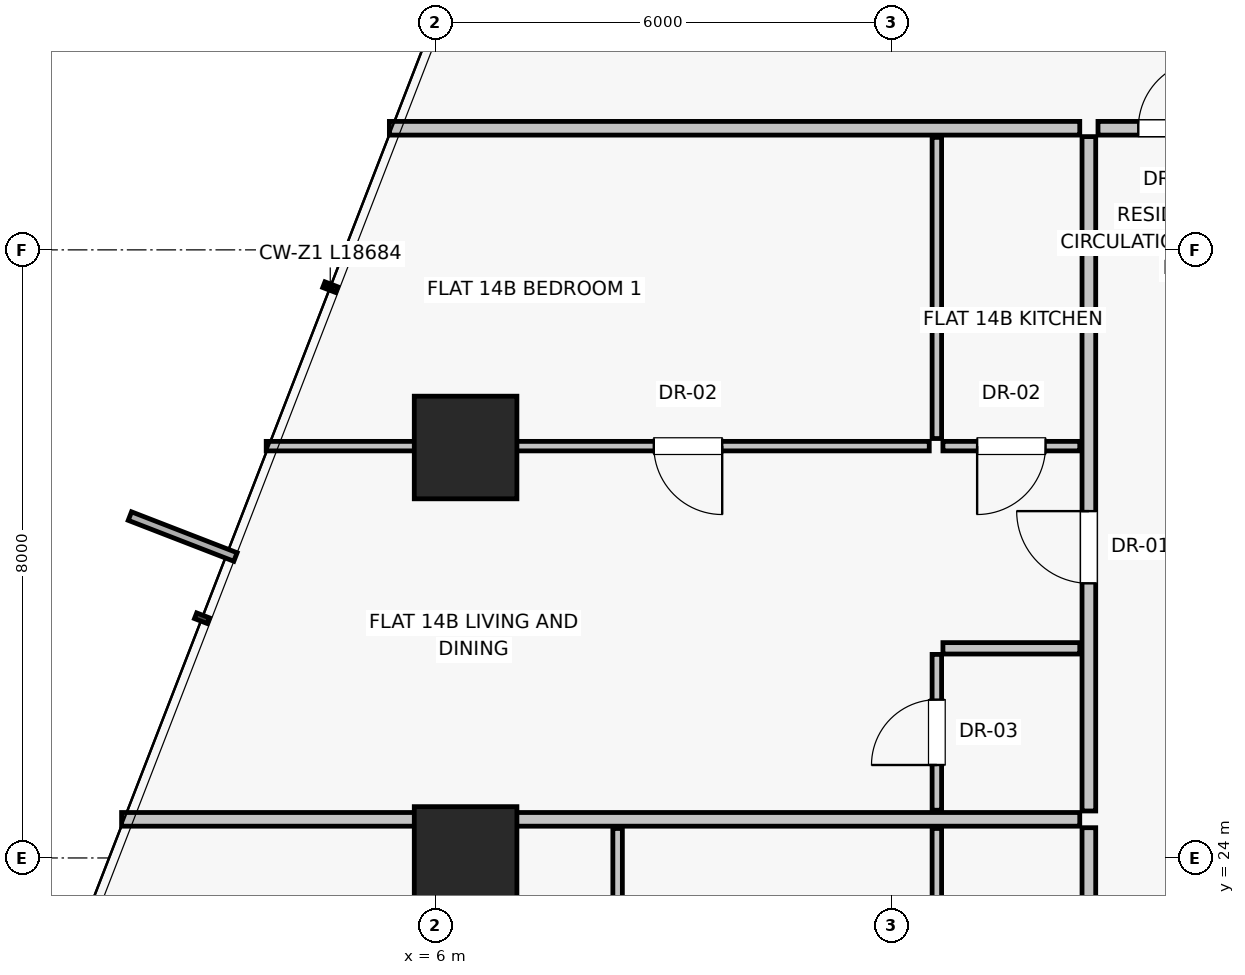
"""IFC4 building model, lengths in metres.
Left out: names, types, materials, properties, quantities, classifications, styles, units other than length and angle.
Written with IfcOpenShell. Run it as: python <this file> out.ifc"""

import sys

from ifc_helpers import new_model, si_unit, direction, frame, frame_2d, origin, origin_2d, place, context, subcontext, project, spatial, rectangle, extrude, source, transform, mapped, element, fill, save


model = new_model("IFC4")
c1 = context("Model", 3, precision=1e-05, world=origin(), true_north=direction((0.0, 1.0)))
c2 = subcontext(c1, "Body", "Model", "MODEL_VIEW")
j1 = project(units=[si_unit("LENGTHUNIT", "METRE"), si_unit("PLANEANGLEUNIT", "RADIAN")], contexts=[c1])
p1 = place(None, origin())
s1 = spatial("IfcSite", under=j1, at=p1, CompositionType="ELEMENT")
p2 = place(p1, origin())
s2 = spatial("IfcBuilding", under=s1, at=p2, CompositionType="ELEMENT")
p3 = place(p2, frame((0.0, 0.0, 53.3)))
s3 = spatial("IfcBuildingStorey", under=s2, at=p3, CompositionType="ELEMENT", Elevation=53.3)
for number, where, z_axis, x_axis in (
    (1, (6.4, 29.4, 0.0), (0.0, 0.0, 1.0), (1.0, 0.0, 0.0)),
    (2, (6.4, 24.0, 0.0), (0.0, 0.0, 1.0), (1.0, 0.0, 0.0)),
):
    element("IfcColumn", number, at=place(p3, frame(where, z_axis=z_axis, x_axis=x_axis)), inside=s3, PredefinedType="COLUMN", context=c2, shape_type="SweptSolid", body=[
        extrude(rectangle(XDim=1.35, YDim=1.35, at=origin_2d()), origin(), (0.0, 0.0, 1.0), 3.25),
    ])
p4 = place(p3, frame((14.48, 33.6, 0.0), z_axis=(0.0, 0.0, 1.0), x_axis=(-1.0, 0.0, 0.0)))
e3 = element("IfcWall", 3, at=p4, inside=s3, PredefinedType="PARTITIONING", context=c2, shape_type="SweptSolid", body=[
    extrude(rectangle(XDim=9.083, YDim=0.18, at=frame_2d((4.542, 0.0))), origin(), (0.0, 0.0, 1.0), 2.97),
])
p5 = place(p3, frame((14.6, 14.31, 0.0), z_axis=(0.0, 0.0, 1.0), x_axis=(0.0, 1.0, 0.0)))
e4 = element("IfcWall", 4, at=p5, inside=s3, PredefinedType="PARTITIONING", context=c2, shape_type="SweptSolid", body=[
    extrude(rectangle(XDim=10.088, YDim=0.18, at=frame_2d((5.044, 0.0))), origin(), (0.0, 0.0, 1.0), 2.97),
])
p6 = place(p5, frame((3.426, 0.0, 0.0)))
e5 = element("IfcOpeningElement", 5, at=p6, cuts=e4, PredefinedType="OPENING", context=c2, shape_type="SweptSolid", body=[
    extrude(rectangle(XDim=0.95, YDim=2.02, at=frame_2d((0.475, 1.01))), frame((0.0, 0.1, 0.0), z_axis=(0.0, -1.0, 0.0), x_axis=(1.0, 0.0, 0.0)), (0.0, 0.0, 1.0), 0.2),
])
for number, where, z_axis, x_axis in (
    (6, (12.6, 20.072, 0.0), (0.0, 0.0, 1.0), (0.0, 1.0, 0.0)),
    (7, (8.4, 20.072, 0.0), (0.0, 0.0, 1.0), (0.0, 1.0, 0.0)),
):
    element("IfcWall", number, at=place(p3, frame(where, z_axis=z_axis, x_axis=x_axis)), inside=s3, PredefinedType="PARTITIONING", context=c2, shape_type="SweptSolid", body=[
        extrude(rectangle(XDim=4.316, YDim=0.125, at=frame_2d((2.158, 0.0))), origin(), (0.0, 0.0, 1.0), 2.97),
    ])
p7 = place(p3, frame((14.48, 24.508, 0.0), z_axis=(0.0, 0.0, 1.0), x_axis=(-1.0, 0.0, 0.0)))
e8 = element("IfcWall", 8, at=p7, inside=s3, PredefinedType="PARTITIONING", context=c2, shape_type="SweptSolid", body=[
    extrude(rectangle(XDim=12.605, YDim=0.18, at=frame_2d((6.303, 0.0))), origin(), (0.0, 0.0, 1.0), 2.97),
])
p8 = place(p3, frame((14.6, 24.618, 0.0), z_axis=(0.0, 0.0, 1.0), x_axis=(0.0, 1.0, 0.0)))
e9 = element("IfcWall", 9, at=p8, inside=s3, PredefinedType="PARTITIONING", context=c2, shape_type="SweptSolid", body=[
    extrude(rectangle(XDim=8.872, YDim=0.18, at=frame_2d((4.436, 0.0))), origin(), (0.0, 0.0, 1.0), 2.97),
])
p9 = place(p8, frame((2.995, 0.0, 0.0)))
e10 = element("IfcOpeningElement", 10, at=p9, cuts=e9, PredefinedType="OPENING", context=c2, shape_type="SweptSolid", body=[
    extrude(rectangle(XDim=0.95, YDim=2.02, at=frame_2d((0.475, 1.01))), frame((0.0, 0.1, 0.0), z_axis=(0.0, -1.0, 0.0), x_axis=(1.0, 0.0, 0.0)), (0.0, 0.0, 1.0), 0.2),
])
p10 = place(p3, frame((14.48, 26.758, 0.0), z_axis=(0.0, 0.0, 1.0), x_axis=(-1.0, 0.0, 0.0)))
e11 = element("IfcWall", 11, at=p10, inside=s3, PredefinedType="PARTITIONING", context=c2, shape_type="SweptSolid", body=[
    extrude(rectangle(XDim=1.8, YDim=0.15, at=frame_2d((0.9, 0.0))), origin(), (0.0, 0.0, 1.0), 2.97),
])
p11 = place(p3, frame((12.6, 24.628, 0.0), z_axis=(0.0, 0.0, 1.0), x_axis=(0.0, 1.0, 0.0)))
e12 = element("IfcWall", 12, at=p11, inside=s3, PredefinedType="PARTITIONING", context=c2, shape_type="SweptSolid", body=[
    extrude(rectangle(XDim=2.05, YDim=0.125, at=frame_2d((1.025, 0.0))), origin(), (0.0, 0.0, 1.0), 2.97),
])
p12 = place(p11, frame((0.595, 0.0, 0.0)))
e13 = element("IfcOpeningElement", 13, at=p12, cuts=e12, PredefinedType="OPENING", context=c2, shape_type="SweptSolid", body=[
    extrude(rectangle(XDim=0.86, YDim=2.01, at=frame_2d((0.43, 1.005))), frame((0.0, 0.073, 0.0), z_axis=(0.0, -1.0, 0.0), x_axis=(1.0, 0.0, 0.0)), (0.0, 0.0, 1.0), 0.145),
])
p13 = place(p3, frame((14.48, 29.418, 0.0), z_axis=(0.0, 0.0, 1.0), x_axis=(-1.0, 0.0, 0.0)))
e14 = element("IfcWall", 14, at=p13, inside=s3, PredefinedType="PARTITIONING", context=c2, shape_type="SweptSolid", body=[
    extrude(rectangle(XDim=1.8, YDim=0.125, at=frame_2d((0.9, 0.0))), origin(), (0.0, 0.0, 1.0), 2.97),
])
p14 = place(p13, frame((0.45, 0.0, 0.0)))
e15 = element("IfcOpeningElement", 15, at=p14, cuts=e14, PredefinedType="OPENING", context=c2, shape_type="SweptSolid", body=[
    extrude(rectangle(XDim=0.9, YDim=2.01, at=frame_2d((0.45, 1.005))), frame((0.0, 0.073, 0.0), z_axis=(0.0, -1.0, 0.0), x_axis=(1.0, 0.0, 0.0)), (0.0, 0.0, 1.0), 0.145),
])
p15 = place(p3, frame((12.6, 29.518, 0.0), z_axis=(0.0, 0.0, 1.0), x_axis=(0.0, 1.0, 0.0)))
e16 = element("IfcWall", 16, at=p15, inside=s3, PredefinedType="PARTITIONING", context=c2, shape_type="SweptSolid", body=[
    extrude(rectangle(XDim=3.962, YDim=0.125, at=frame_2d((1.981, 0.0))), origin(), (0.0, 0.0, 1.0), 2.97),
])
p16 = place(p3, frame((12.5, 29.418, 0.0), z_axis=(0.0, 0.0, 1.0), x_axis=(-1.0, 0.0, 0.0)))
e17 = element("IfcWall", 17, at=p16, inside=s3, PredefinedType="PARTITIONING", context=c2, shape_type="SweptSolid", body=[
    extrude(rectangle(XDim=8.723, YDim=0.125, at=frame_2d((4.362, 0.0))), origin(), (0.0, 0.0, 1.0), 2.269),
])
p17 = place(p16, frame((2.724, 0.0, 0.0)))
e18 = element("IfcOpeningElement", 18, at=p17, cuts=e17, PredefinedType="OPENING", context=c2, shape_type="SweptSolid", body=[
    extrude(rectangle(XDim=0.9, YDim=2.01, at=frame_2d((0.45, 1.005))), frame((0.0, 0.073, 0.0), z_axis=(0.0, -1.0, 0.0), x_axis=(1.0, 0.0, 0.0)), (0.0, 0.0, 1.0), 0.145),
])
p18 = place(p3, frame((14.72, 33.6, 0.0), z_axis=(0.0, 0.0, 1.0), x_axis=(1.0, 0.0, 0.0)))
e19 = element("IfcWall", 19, at=p18, inside=s3, PredefinedType="PARTITIONING", context=c2, shape_type="SweptSolid", body=[
    extrude(rectangle(XDim=1.96, YDim=0.18, at=frame_2d((0.98, 0.0))), origin(), (0.0, 0.0, 1.0), 2.97),
])
p19 = place(p18, frame((0.53, 0.0, 0.0)))
e20 = element("IfcOpeningElement", 20, at=p19, cuts=e19, PredefinedType="OPENING", context=c2, shape_type="SweptSolid", body=[
    extrude(rectangle(XDim=0.9, YDim=2.01, at=frame_2d((0.45, 1.005))), frame((0.0, 0.1, 0.0), z_axis=(0.0, -1.0, 0.0), x_axis=(1.0, 0.0, 0.0)), (0.0, 0.0, 1.0), 0.2),
])
m1 = source(origin(), c2, "Body", "SweptSolid", [
    extrude(rectangle(XDim=0.95, YDim=2.02, at=frame_2d((0.475, 1.01))), frame((0.0, 0.025, 0.0), z_axis=(0.0, -1.0, 0.0), x_axis=(1.0, 0.0, 0.0)), (0.0, 0.0, 1.0), 0.05),
])
p20 = place(p9, origin())
e21 = element("IfcDoor", 21, at=p20, inside=s3, OperationType="SINGLE_SWING_RIGHT", PredefinedType="DOOR", context=c2, shape_type="MappedRepresentation", body=[
    mapped(m1, transform((0.0, 0.0, 0.0), scale=1.0)),
])
fill(e10, e21)
m2 = source(origin(), c2, "Body", "SweptSolid", [
    extrude(rectangle(XDim=0.86, YDim=2.01, at=frame_2d((0.43, 1.005))), frame((0.0, 0.025, 0.0), z_axis=(0.0, -1.0, 0.0), x_axis=(1.0, 0.0, 0.0)), (0.0, 0.0, 1.0), 0.05),
])
p21 = place(p12, origin())
e22 = element("IfcDoor", 22, at=p21, inside=s3, OperationType="SINGLE_SWING_LEFT", PredefinedType="DOOR", context=c2, shape_type="MappedRepresentation", body=[
    mapped(m2, transform((0.0, 0.0, 0.0), scale=1.0)),
])
fill(e13, e22)
m3 = source(origin(), c2, "Body", "SweptSolid", [
    extrude(rectangle(XDim=0.9, YDim=2.01, at=frame_2d((0.45, 1.005))), frame((0.0, 0.025, 0.0), z_axis=(0.0, -1.0, 0.0), x_axis=(1.0, 0.0, 0.0)), (0.0, 0.0, 1.0), 0.05),
])
p22 = place(p14, origin())
e23 = element("IfcDoor", 23, at=p22, inside=s3, OperationType="SINGLE_SWING_RIGHT", PredefinedType="DOOR", context=c2, shape_type="MappedRepresentation", body=[
    mapped(m3, transform((0.0, 0.0, 0.0), scale=1.0)),
])
fill(e15, e23)
p23 = place(p17, origin())
e24 = element("IfcDoor", 24, at=p23, inside=s3, OperationType="SINGLE_SWING_LEFT", PredefinedType="DOOR", context=c2, shape_type="MappedRepresentation", body=[
    mapped(m3, transform((0.0, 0.0, 0.0), scale=1.0)),
])
fill(e18, e24)
p24 = place(p19, origin())
e25 = element("IfcDoor", 25, at=p24, inside=s3, OperationType="SINGLE_SWING_RIGHT", PredefinedType="DOOR", context=c2, shape_type="MappedRepresentation", body=[
    mapped(m3, transform((0.0, 0.0, 0.0), scale=1.0)),
])
fill(e20, e25)
save(model, sys.argv[1])
